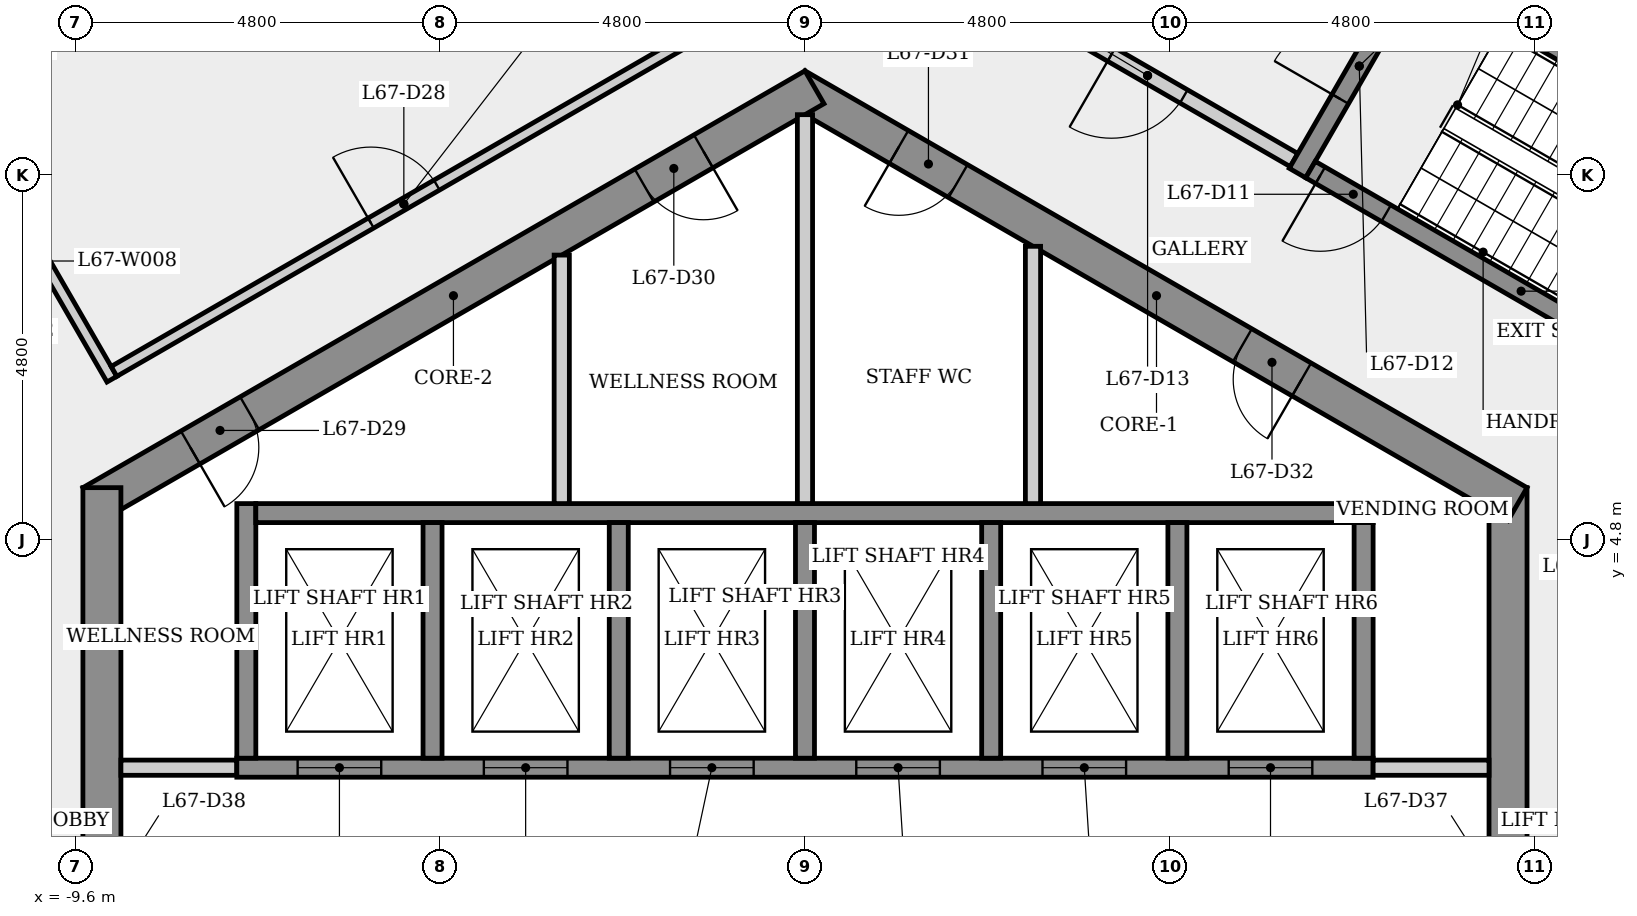
"""IFC4 building model, lengths in metres.
Left out: names, types, materials, properties, quantities, classifications, styles, units other than length and angle.
Written with IfcOpenShell. Run it as: python <this file> out.ifc"""

import sys

from ifc_helpers import new_model, si_unit, direction, frame, frame_2d, origin, place, context, subcontext, project, spatial, rectangle, extrude, element, fill, save


model = new_model("IFC4")
c1 = context("Model", 3, precision=1e-05, world=origin(), true_north=direction((0.0, 1.0)))
c2 = subcontext(c1, "Body", "Model", "MODEL_VIEW")
j1 = project(units=[si_unit("LENGTHUNIT", "METRE"), si_unit("PLANEANGLEUNIT", "RADIAN")], contexts=[c1])
p1 = place(None, origin())
s1 = spatial("IfcSite", under=j1, at=p1, CompositionType="ELEMENT")
p2 = place(p1, origin())
s2 = spatial("IfcBuilding", under=s1, at=p2, CompositionType="ELEMENT")
p3 = place(p2, frame((0.0, 0.0, 249.5)))
s3 = spatial("IfcBuildingStorey", under=s2, at=p3, CompositionType="ELEMENT", Elevation=249.5)
p4 = place(p3, frame((9.25, -5.485, 0.0), z_axis=(0.0, 0.0, 1.0), x_axis=(0.0, 1.0, 0.0)))
e1 = element("IfcWall", 1, at=p4, inside=s3, PredefinedType="SHEAR", context=c2, shape_type="SweptSolid", body=[
    extrude(rectangle(XDim=10.97, YDim=0.5, at=frame_2d((5.485, 0.0))), origin(), (0.0, 0.0, 1.0), 3.4),
])
p5 = place(p4, frame((4.685, 0.0, 0.0)))
e2 = element("IfcOpeningElement", 2, at=p5, cuts=e1, PredefinedType="OPENING", context=c2, shape_type="SweptSolid", body=[
    extrude(rectangle(XDim=1.6, YDim=2.1, at=frame_2d((0.8, 1.05))), frame((0.0, 0.26, 0.0), z_axis=(0.0, -1.0, 0.0), x_axis=(1.0, 0.0, 0.0)), (0.0, 0.0, 1.0), 0.52),
])
p6 = place(p3, frame((9.375, 5.268, 0.0), z_axis=(0.0, 0.0, 1.0), x_axis=(-0.866023993627, 0.500002442456, 0.0)))
e3 = element("IfcWall", 3, at=p6, inside=s3, PredefinedType="SHEAR", context=c2, shape_type="SweptSolid", body=[
    extrude(rectangle(XDim=10.97, YDim=0.5, at=frame_2d((5.485, 0.0))), origin(), (0.0, 0.0, 1.0), 3.4),
])
p7 = place(p6, frame((8.5, 0.0, 0.0)))
e4 = element("IfcOpeningElement", 4, at=p7, cuts=e3, PredefinedType="OPENING", context=c2, shape_type="SweptSolid", body=[
    extrude(rectangle(XDim=0.9, YDim=2.1, at=frame_2d((0.45, 1.05))), frame((0.0, 0.26, 0.0), z_axis=(0.0, -1.0, 0.0), x_axis=(1.0, 0.0, 0.0)), (0.0, 0.0, 1.0), 0.52),
])
p8 = place(p6, frame((3.28, 0.0, 0.0)))
e5 = element("IfcOpeningElement", 5, at=p8, cuts=e3, PredefinedType="OPENING", context=c2, shape_type="SweptSolid", body=[
    extrude(rectangle(XDim=0.9, YDim=2.1, at=frame_2d((0.45, 1.05))), frame((0.0, 0.26, 0.0), z_axis=(0.0, -1.0, 0.0), x_axis=(1.0, 0.0, 0.0)), (0.0, 0.0, 1.0), 0.52),
])
p9 = place(p3, frame((0.125, 10.753, 0.0), z_axis=(0.0, 0.0, 1.0), x_axis=(-0.866023993627, -0.500002442456, 0.0)))
e6 = element("IfcWall", 6, at=p9, inside=s3, PredefinedType="SHEAR", context=c2, shape_type="SweptSolid", body=[
    extrude(rectangle(XDim=10.97, YDim=0.5, at=frame_2d((5.485, 0.0))), origin(), (0.0, 0.0, 1.0), 3.4),
])
p10 = place(p9, frame((8.581, 0.0, 0.0)))
e7 = element("IfcOpeningElement", 7, at=p10, cuts=e6, PredefinedType="OPENING", context=c2, shape_type="SweptSolid", body=[
    extrude(rectangle(XDim=0.9, YDim=2.1, at=frame_2d((0.45, 1.05))), frame((0.0, 0.26, 0.0), z_axis=(0.0, -1.0, 0.0), x_axis=(1.0, 0.0, 0.0)), (0.0, 0.0, 1.0), 0.52),
])
p11 = place(p9, frame((1.687, 0.0, 0.0)))
e8 = element("IfcOpeningElement", 8, at=p11, cuts=e6, PredefinedType="OPENING", context=c2, shape_type="SweptSolid", body=[
    extrude(rectangle(XDim=0.9, YDim=2.1, at=frame_2d((0.45, 1.05))), frame((0.0, 0.26, 0.0), z_axis=(0.0, -1.0, 0.0), x_axis=(1.0, 0.0, 0.0)), (0.0, 0.0, 1.0), 0.52),
])
p12 = place(p3, frame((-9.25, 5.485, 0.0), z_axis=(0.0, 0.0, 1.0), x_axis=(0.0, -1.0, 0.0)))
e9 = element("IfcWall", 9, at=p12, inside=s3, PredefinedType="SHEAR", context=c2, shape_type="SweptSolid", body=[
    extrude(rectangle(XDim=10.97, YDim=0.5, at=frame_2d((5.485, 0.0))), origin(), (0.0, 0.0, 1.0), 3.4),
])
p13 = place(p12, frame((8.51, 0.0, 0.0)))
e10 = element("IfcOpeningElement", 10, at=p13, cuts=e9, PredefinedType="OPENING", context=c2, shape_type="SweptSolid", body=[
    extrude(rectangle(XDim=0.9, YDim=2.1, at=frame_2d((0.45, 1.05))), frame((0.0, 0.26, 0.0), z_axis=(0.0, -1.0, 0.0), x_axis=(1.0, 0.0, 0.0)), (0.0, 0.0, 1.0), 0.52),
])
p14 = place(p12, frame((4.685, 0.0, 0.0)))
e11 = element("IfcOpeningElement", 11, at=p14, cuts=e9, PredefinedType="OPENING", context=c2, shape_type="SweptSolid", body=[
    extrude(rectangle(XDim=1.6, YDim=2.1, at=frame_2d((0.8, 1.05))), frame((0.0, 0.26, 0.0), z_axis=(0.0, -1.0, 0.0), x_axis=(1.0, 0.0, 0.0)), (0.0, 0.0, 1.0), 0.52),
])
p15 = place(p3, frame((-10.914, 10.022, 0.0), z_axis=(0.0, 0.0, 1.0), x_axis=(0.499955890556, -0.866050868886, 0.0)))
e12 = element("IfcWall", 12, at=p15, inside=s3, PredefinedType="PARTITIONING", context=c2, shape_type="SweptSolid", body=[
    extrude(rectangle(XDim=3.591, YDim=0.15, at=frame_2d((1.795, 0.0))), origin(), (0.0, 0.0, 1.0), 3.0),
])
p16 = place(p3, frame((-9.091, 7.014, 0.0), z_axis=(0.0, 0.0, 1.0), x_axis=(0.866035548006, 0.499982429281, 0.0)))
e13 = element("IfcWall", 13, at=p16, inside=s3, PredefinedType="PARTITIONING", context=c2, shape_type="SweptSolid", body=[
    extrude(rectangle(XDim=8.806, YDim=0.15, at=frame_2d((4.403, 0.0))), origin(), (0.0, 0.0, 1.0), 3.0),
])
p17 = place(p16, frame((3.903, 0.0, 0.0)))
e14 = element("IfcOpeningElement", 14, at=p17, cuts=e13, PredefinedType="OPENING", context=c2, shape_type="SweptSolid", body=[
    extrude(rectangle(XDim=1.0, YDim=2.1, at=frame_2d((0.5, 1.05))), frame((0.0, 0.085, 0.0), z_axis=(0.0, -1.0, 0.0), x_axis=(1.0, 0.0, 0.0)), (0.0, 0.0, 1.0), 0.17),
])
p18 = place(p3, frame((-9.0, 1.8, 0.0), z_axis=(0.0, 0.0, 1.0), x_axis=(1.0, 0.0, 0.0)))
e15 = element("IfcWall", 15, at=p18, inside=s3, PredefinedType="PARTITIONING", context=c2, shape_type="SweptSolid", body=[
    extrude(rectangle(XDim=1.525, YDim=0.2, at=frame_2d((0.763, 0.0))), origin(), (0.0, 0.0, 1.0), 3.0),
])
p19 = place(p3, frame((-7.475, 1.8, 0.0), z_axis=(0.0, 0.0, 1.0), x_axis=(1.0, 0.0, 0.0)))
e16 = element("IfcWall", 16, at=p19, inside=s3, PredefinedType="SHEAR", context=c2, shape_type="SweptSolid", body=[
    extrude(rectangle(XDim=14.95, YDim=0.25, at=frame_2d((7.475, 0.0))), origin(), (0.0, 0.0, 1.0), 3.0),
])
p20 = place(p19, frame((0.8, 0.0, 0.0)))
e17 = element("IfcOpeningElement", 17, at=p20, cuts=e16, PredefinedType="OPENING", context=c2, shape_type="SweptSolid", body=[
    extrude(rectangle(XDim=1.1, YDim=2.1, at=frame_2d((0.55, 1.05))), frame((0.0, 0.135, 0.0), z_axis=(0.0, -1.0, 0.0), x_axis=(1.0, 0.0, 0.0)), (0.0, 0.0, 1.0), 0.27),
])
p21 = place(p19, frame((3.25, 0.0, 0.0)))
e18 = element("IfcOpeningElement", 18, at=p21, cuts=e16, PredefinedType="OPENING", context=c2, shape_type="SweptSolid", body=[
    extrude(rectangle(XDim=1.1, YDim=2.1, at=frame_2d((0.55, 1.05))), frame((0.0, 0.135, 0.0), z_axis=(0.0, -1.0, 0.0), x_axis=(1.0, 0.0, 0.0)), (0.0, 0.0, 1.0), 0.27),
])
p22 = place(p19, frame((5.7, 0.0, 0.0)))
e19 = element("IfcOpeningElement", 19, at=p22, cuts=e16, PredefinedType="OPENING", context=c2, shape_type="SweptSolid", body=[
    extrude(rectangle(XDim=1.1, YDim=2.1, at=frame_2d((0.55, 1.05))), frame((0.0, 0.135, 0.0), z_axis=(0.0, -1.0, 0.0), x_axis=(1.0, 0.0, 0.0)), (0.0, 0.0, 1.0), 0.27),
])
p23 = place(p19, frame((8.15, 0.0, 0.0)))
e20 = element("IfcOpeningElement", 20, at=p23, cuts=e16, PredefinedType="OPENING", context=c2, shape_type="SweptSolid", body=[
    extrude(rectangle(XDim=1.1, YDim=2.1, at=frame_2d((0.55, 1.05))), frame((0.0, 0.135, 0.0), z_axis=(0.0, -1.0, 0.0), x_axis=(1.0, 0.0, 0.0)), (0.0, 0.0, 1.0), 0.27),
])
p24 = place(p19, frame((10.6, 0.0, 0.0)))
e21 = element("IfcOpeningElement", 21, at=p24, cuts=e16, PredefinedType="OPENING", context=c2, shape_type="SweptSolid", body=[
    extrude(rectangle(XDim=1.1, YDim=2.1, at=frame_2d((0.55, 1.05))), frame((0.0, 0.135, 0.0), z_axis=(0.0, -1.0, 0.0), x_axis=(1.0, 0.0, 0.0)), (0.0, 0.0, 1.0), 0.27),
])
p25 = place(p19, frame((13.05, 0.0, 0.0)))
e22 = element("IfcOpeningElement", 22, at=p25, cuts=e16, PredefinedType="OPENING", context=c2, shape_type="SweptSolid", body=[
    extrude(rectangle(XDim=1.1, YDim=2.1, at=frame_2d((0.55, 1.05))), frame((0.0, 0.135, 0.0), z_axis=(0.0, -1.0, 0.0), x_axis=(1.0, 0.0, 0.0)), (0.0, 0.0, 1.0), 0.27),
])
p26 = place(p3, frame((-7.35, 1.925, 0.0), z_axis=(0.0, 0.0, 1.0), x_axis=(0.0, 1.0, 0.0)))
e23 = element("IfcWall", 23, at=p26, inside=s3, PredefinedType="SHEAR", context=c2, shape_type="SweptSolid", body=[
    extrude(rectangle(XDim=3.35, YDim=0.25, at=frame_2d((1.675, 0.0))), origin(), (0.0, 0.0, 1.0), 3.0),
])
p27 = place(p3, frame((-7.225, 5.15, 0.0), z_axis=(0.0, 0.0, 1.0), x_axis=(1.0, 0.0, 0.0)))
e24 = element("IfcWall", 24, at=p27, inside=s3, PredefinedType="SHEAR", context=c2, shape_type="SweptSolid", body=[
    extrude(rectangle(XDim=14.7, YDim=0.25, at=frame_2d((7.35, 0.0))), origin(), (0.0, 0.0, 1.0), 3.0),
])
p28 = place(p3, frame((-4.9, 5.025, 0.0), z_axis=(0.0, 0.0, 1.0), x_axis=(0.0, -1.0, 0.0)))
e25 = element("IfcWall", 25, at=p28, inside=s3, PredefinedType="SHEAR", context=c2, shape_type="SweptSolid", body=[
    extrude(rectangle(XDim=3.1, YDim=0.25, at=frame_2d((1.55, 0.0))), origin(), (0.0, 0.0, 1.0), 3.4),
])
p29 = place(p3, frame((-3.2, 8.545, 0.0), z_axis=(0.0, 0.0, 1.0), x_axis=(0.0, -1.0, 0.0)))
e26 = element("IfcWall", 26, at=p29, inside=s3, PredefinedType="PARTITIONING", context=c2, shape_type="SweptSolid", body=[
    extrude(rectangle(XDim=3.27, YDim=0.2, at=frame_2d((1.635, 0.0))), origin(), (0.0, 0.0, 1.0), 3.0),
])
for number, where, z_axis, x_axis in (
    (27, (-2.45, 5.025, 0.0), (0.0, 0.0, 1.0), (0.0, -1.0, 0.0)),
    (28, (0.0, 5.025, 0.0), (0.0, 0.0, 1.0), (0.0, -1.0, 0.0)),
):
    element("IfcWall", number, at=place(p3, frame(where, z_axis=z_axis, x_axis=x_axis)), inside=s3, PredefinedType="SHEAR", context=c2, shape_type="SweptSolid", body=[
        extrude(rectangle(XDim=3.1, YDim=0.25, at=frame_2d((1.55, 0.0))), origin(), (0.0, 0.0, 1.0), 3.4),
    ])
p30 = place(p3, frame((0.0, 10.392, 0.0), z_axis=(0.0, 0.0, 1.0), x_axis=(0.0, -1.0, 0.0)))
e29 = element("IfcWall", 29, at=p30, inside=s3, PredefinedType="PARTITIONING", context=c2, shape_type="SweptSolid", body=[
    extrude(rectangle(XDim=5.117, YDim=0.2, at=frame_2d((2.559, 0.0))), origin(), (0.0, 0.0, 1.0), 3.0),
])
p31 = place(p3, frame((2.45, 5.025, 0.0), z_axis=(0.0, 0.0, 1.0), x_axis=(0.0, -1.0, 0.0)))
e30 = element("IfcWall", 30, at=p31, inside=s3, PredefinedType="SHEAR", context=c2, shape_type="SweptSolid", body=[
    extrude(rectangle(XDim=3.1, YDim=0.25, at=frame_2d((1.55, 0.0))), origin(), (0.0, 0.0, 1.0), 3.4),
])
p32 = place(p3, frame((3.0, 8.66, 0.0), z_axis=(0.0, 0.0, 1.0), x_axis=(0.0, -1.0, 0.0)))
e31 = element("IfcWall", 31, at=p32, inside=s3, PredefinedType="PARTITIONING", context=c2, shape_type="SweptSolid", body=[
    extrude(rectangle(XDim=3.385, YDim=0.2, at=frame_2d((1.693, 0.0))), origin(), (0.0, 0.0, 1.0), 3.0),
])
p33 = place(p3, frame((4.9, 5.025, 0.0), z_axis=(0.0, 0.0, 1.0), x_axis=(0.0, -1.0, 0.0)))
e32 = element("IfcWall", 32, at=p33, inside=s3, PredefinedType="SHEAR", context=c2, shape_type="SweptSolid", body=[
    extrude(rectangle(XDim=3.1, YDim=0.25, at=frame_2d((1.55, 0.0))), origin(), (0.0, 0.0, 1.0), 3.4),
])
p34 = place(p3, frame((6.435, 9.795, 0.0), z_axis=(0.0, 0.0, 1.0), x_axis=(-0.866012907634, 0.500021643343, 0.0)))
e33 = element("IfcWall", 33, at=p34, inside=s3, PredefinedType="PARTITIONING", context=c2, shape_type="SweptSolid", body=[
    extrude(rectangle(XDim=4.45, YDim=0.2, at=frame_2d((2.225, 0.0))), origin(), (0.0, 0.0, 1.0), 3.0),
])
p35 = place(p34, frame((1.675, 0.0, 0.0)))
e34 = element("IfcOpeningElement", 34, at=p35, cuts=e33, PredefinedType="OPENING", context=c2, shape_type="SweptSolid", body=[
    extrude(rectangle(XDim=1.1, YDim=2.1, at=frame_2d((0.55, 1.05))), frame((0.0, 0.11, 0.0), z_axis=(0.0, -1.0, 0.0), x_axis=(1.0, 0.0, 0.0)), (0.0, 0.0, 1.0), 0.22),
])
p36 = place(p3, frame((6.48, 9.624, 0.0), z_axis=(0.0, 0.0, 1.0), x_axis=(0.500017246033, 0.866015446554, 0.0)))
e35 = element("IfcWall", 35, at=p36, inside=s3, PredefinedType="SHEAR", context=c2, shape_type="SweptSolid", body=[
    extrude(rectangle(XDim=3.25, YDim=0.25, at=frame_2d((1.625, 0.0))), origin(), (0.0, 0.0, 1.0), 3.0),
])
p37 = place(p36, frame((1.125, 0.0, 0.0)))
e36 = element("IfcOpeningElement", 36, at=p37, cuts=e35, PredefinedType="OPENING", context=c2, shape_type="SweptSolid", body=[
    extrude(rectangle(XDim=1.0, YDim=2.1, at=frame_2d((0.5, 1.05))), frame((0.0, 0.135, 0.0), z_axis=(0.0, -1.0, 0.0), x_axis=(1.0, 0.0, 0.0)), (0.0, 0.0, 1.0), 0.27),
])
p38 = place(p3, frame((7.475, 1.8, 0.0), z_axis=(0.0, 0.0, 1.0), x_axis=(1.0, 0.0, 0.0)))
e37 = element("IfcWall", 37, at=p38, inside=s3, PredefinedType="PARTITIONING", context=c2, shape_type="SweptSolid", body=[
    extrude(rectangle(XDim=1.525, YDim=0.2, at=frame_2d((0.763, 0.0))), origin(), (0.0, 0.0, 1.0), 3.0),
])
p39 = place(p3, frame((7.35, 5.025, 0.0), z_axis=(0.0, 0.0, 1.0), x_axis=(0.0, -1.0, 0.0)))
e38 = element("IfcWall", 38, at=p39, inside=s3, PredefinedType="SHEAR", context=c2, shape_type="SweptSolid", body=[
    extrude(rectangle(XDim=3.1, YDim=0.25, at=frame_2d((1.55, 0.0))), origin(), (0.0, 0.0, 1.0), 3.4),
])
p40 = place(p3, frame((8.151, 12.268, 0.0), z_axis=(0.0, 0.0, 1.0), x_axis=(0.866025499775, -0.499999833739, 0.0)))
e39 = element("IfcWall", 39, at=p40, inside=s3, PredefinedType="SHEAR", context=c2, shape_type="SweptSolid", body=[
    extrude(rectangle(XDim=6.4, YDim=0.25, at=frame_2d((3.2, 0.0))), origin(), (0.0, 0.0, 1.0), 3.0),
])
p41 = place(p3, frame((12.194, 6.47, 0.0), z_axis=(0.0, 0.0, 1.0), x_axis=(-0.866025499775, 0.499999833739, 0.0)))
e40 = element("IfcWall", 40, at=p41, inside=s3, PredefinedType="SHEAR", context=c2, shape_type="SweptSolid", body=[
    extrude(rectangle(XDim=6.4, YDim=0.25, at=frame_2d((3.2, 0.0))), origin(), (0.0, 0.0, 1.0), 3.0),
])
p42 = place(p41, frame((5.25, 0.0, 0.0)))
e41 = element("IfcOpeningElement", 41, at=p42, cuts=e40, PredefinedType="OPENING", context=c2, shape_type="SweptSolid", body=[
    extrude(rectangle(XDim=1.0, YDim=2.1, at=frame_2d((0.5, 1.05))), frame((0.0, 0.135, 0.0), z_axis=(0.0, -1.0, 0.0), x_axis=(1.0, 0.0, 0.0)), (0.0, 0.0, 1.0), 0.27),
])
p43 = place(p20, origin())
e42 = element("IfcDoor", 42, at=p43, inside=s3, OperationType="SLIDING_TO_LEFT", PredefinedType="DOOR", context=c2, shape_type="SweptSolid", body=[
    extrude(rectangle(XDim=1.1, YDim=2.1, at=frame_2d((0.55, 1.05))), frame((0.0, 0.025, 0.0), z_axis=(0.0, -1.0, 0.0), x_axis=(1.0, 0.0, 0.0)), (0.0, 0.0, 1.0), 0.05),
])
fill(e17, e42)
p44 = place(p21, origin())
e43 = element("IfcDoor", 43, at=p44, inside=s3, OperationType="SLIDING_TO_LEFT", PredefinedType="DOOR", context=c2, shape_type="SweptSolid", body=[
    extrude(rectangle(XDim=1.1, YDim=2.1, at=frame_2d((0.55, 1.05))), frame((0.0, 0.025, 0.0), z_axis=(0.0, -1.0, 0.0), x_axis=(1.0, 0.0, 0.0)), (0.0, 0.0, 1.0), 0.05),
])
fill(e18, e43)
p45 = place(p22, origin())
e44 = element("IfcDoor", 44, at=p45, inside=s3, OperationType="SLIDING_TO_LEFT", PredefinedType="DOOR", context=c2, shape_type="SweptSolid", body=[
    extrude(rectangle(XDim=1.1, YDim=2.1, at=frame_2d((0.55, 1.05))), frame((0.0, 0.025, 0.0), z_axis=(0.0, -1.0, 0.0), x_axis=(1.0, 0.0, 0.0)), (0.0, 0.0, 1.0), 0.05),
])
fill(e19, e44)
p46 = place(p23, origin())
e45 = element("IfcDoor", 45, at=p46, inside=s3, OperationType="SLIDING_TO_LEFT", PredefinedType="DOOR", context=c2, shape_type="SweptSolid", body=[
    extrude(rectangle(XDim=1.1, YDim=2.1, at=frame_2d((0.55, 1.05))), frame((0.0, 0.025, 0.0), z_axis=(0.0, -1.0, 0.0), x_axis=(1.0, 0.0, 0.0)), (0.0, 0.0, 1.0), 0.05),
])
fill(e20, e45)
p47 = place(p24, origin())
e46 = element("IfcDoor", 46, at=p47, inside=s3, OperationType="SLIDING_TO_LEFT", PredefinedType="DOOR", context=c2, shape_type="SweptSolid", body=[
    extrude(rectangle(XDim=1.1, YDim=2.1, at=frame_2d((0.55, 1.05))), frame((0.0, 0.025, 0.0), z_axis=(0.0, -1.0, 0.0), x_axis=(1.0, 0.0, 0.0)), (0.0, 0.0, 1.0), 0.05),
])
fill(e21, e46)
p48 = place(p25, origin())
e47 = element("IfcDoor", 47, at=p48, inside=s3, OperationType="SLIDING_TO_LEFT", PredefinedType="DOOR", context=c2, shape_type="SweptSolid", body=[
    extrude(rectangle(XDim=1.1, YDim=2.1, at=frame_2d((0.55, 1.05))), frame((0.0, 0.025, 0.0), z_axis=(0.0, -1.0, 0.0), x_axis=(1.0, 0.0, 0.0)), (0.0, 0.0, 1.0), 0.05),
])
fill(e22, e47)
p49 = place(p42, origin())
e48 = element("IfcDoor", 48, at=p49, inside=s3, OperationType="SINGLE_SWING_RIGHT", PredefinedType="DOOR", context=c2, shape_type="SweptSolid", body=[
    extrude(rectangle(XDim=1.0, YDim=2.1, at=frame_2d((0.5, 1.05))), frame((0.0, 0.025, 0.0), z_axis=(0.0, -1.0, 0.0), x_axis=(1.0, 0.0, 0.0)), (0.0, 0.0, 1.0), 0.05),
])
fill(e41, e48)
p50 = place(p37, origin())
e49 = element("IfcDoor", 49, at=p50, inside=s3, OperationType="SINGLE_SWING_LEFT", PredefinedType="DOOR", context=c2, shape_type="SweptSolid", body=[
    extrude(rectangle(XDim=1.0, YDim=2.1, at=frame_2d((0.5, 1.05))), frame((0.0, 0.025, 0.0), z_axis=(0.0, -1.0, 0.0), x_axis=(1.0, 0.0, 0.0)), (0.0, 0.0, 1.0), 0.05),
])
fill(e36, e49)
p51 = place(p35, origin())
e50 = element("IfcDoor", 50, at=p51, inside=s3, OperationType="SINGLE_SWING_RIGHT", PredefinedType="DOOR", context=c2, shape_type="SweptSolid", body=[
    extrude(rectangle(XDim=1.1, YDim=2.1, at=frame_2d((0.55, 1.05))), frame((0.0, 0.025, 0.0), z_axis=(0.0, -1.0, 0.0), x_axis=(1.0, 0.0, 0.0)), (0.0, 0.0, 1.0), 0.05),
])
fill(e34, e50)
p52 = place(p17, origin())
e51 = element("IfcDoor", 51, at=p52, inside=s3, OperationType="SINGLE_SWING_LEFT", PredefinedType="DOOR", context=c2, shape_type="SweptSolid", body=[
    extrude(rectangle(XDim=1.0, YDim=2.1, at=frame_2d((0.5, 1.05))), frame((0.0, 0.025, 0.0), z_axis=(0.0, -1.0, 0.0), x_axis=(1.0, 0.0, 0.0)), (0.0, 0.0, 1.0), 0.05),
])
fill(e14, e51)
p53 = place(p10, origin())
e52 = element("IfcDoor", 52, at=p53, inside=s3, OperationType="SINGLE_SWING_RIGHT", PredefinedType="DOOR", context=c2, shape_type="SweptSolid", body=[
    extrude(rectangle(XDim=0.9, YDim=2.1, at=frame_2d((0.45, 1.05))), frame((0.0, 0.025, 0.0), z_axis=(0.0, -1.0, 0.0), x_axis=(1.0, 0.0, 0.0)), (0.0, 0.0, 1.0), 0.05),
])
fill(e7, e52)
p54 = place(p11, origin())
e53 = element("IfcDoor", 53, at=p54, inside=s3, OperationType="SINGLE_SWING_LEFT", PredefinedType="DOOR", context=c2, shape_type="SweptSolid", body=[
    extrude(rectangle(XDim=0.9, YDim=2.1, at=frame_2d((0.45, 1.05))), frame((0.0, 0.025, 0.0), z_axis=(0.0, -1.0, 0.0), x_axis=(1.0, 0.0, 0.0)), (0.0, 0.0, 1.0), 0.05),
])
fill(e8, e53)
p55 = place(p7, origin())
e54 = element("IfcDoor", 54, at=p55, inside=s3, OperationType="SINGLE_SWING_RIGHT", PredefinedType="DOOR", context=c2, shape_type="SweptSolid", body=[
    extrude(rectangle(XDim=0.9, YDim=2.1, at=frame_2d((0.45, 1.05))), frame((0.0, 0.025, 0.0), z_axis=(0.0, -1.0, 0.0), x_axis=(1.0, 0.0, 0.0)), (0.0, 0.0, 1.0), 0.05),
])
fill(e4, e54)
p56 = place(p8, origin())
e55 = element("IfcDoor", 55, at=p56, inside=s3, OperationType="SINGLE_SWING_LEFT", PredefinedType="DOOR", context=c2, shape_type="SweptSolid", body=[
    extrude(rectangle(XDim=0.9, YDim=2.1, at=frame_2d((0.45, 1.05))), frame((0.0, 0.025, 0.0), z_axis=(0.0, -1.0, 0.0), x_axis=(1.0, 0.0, 0.0)), (0.0, 0.0, 1.0), 0.05),
])
fill(e5, e55)
save(model, sys.argv[1])
